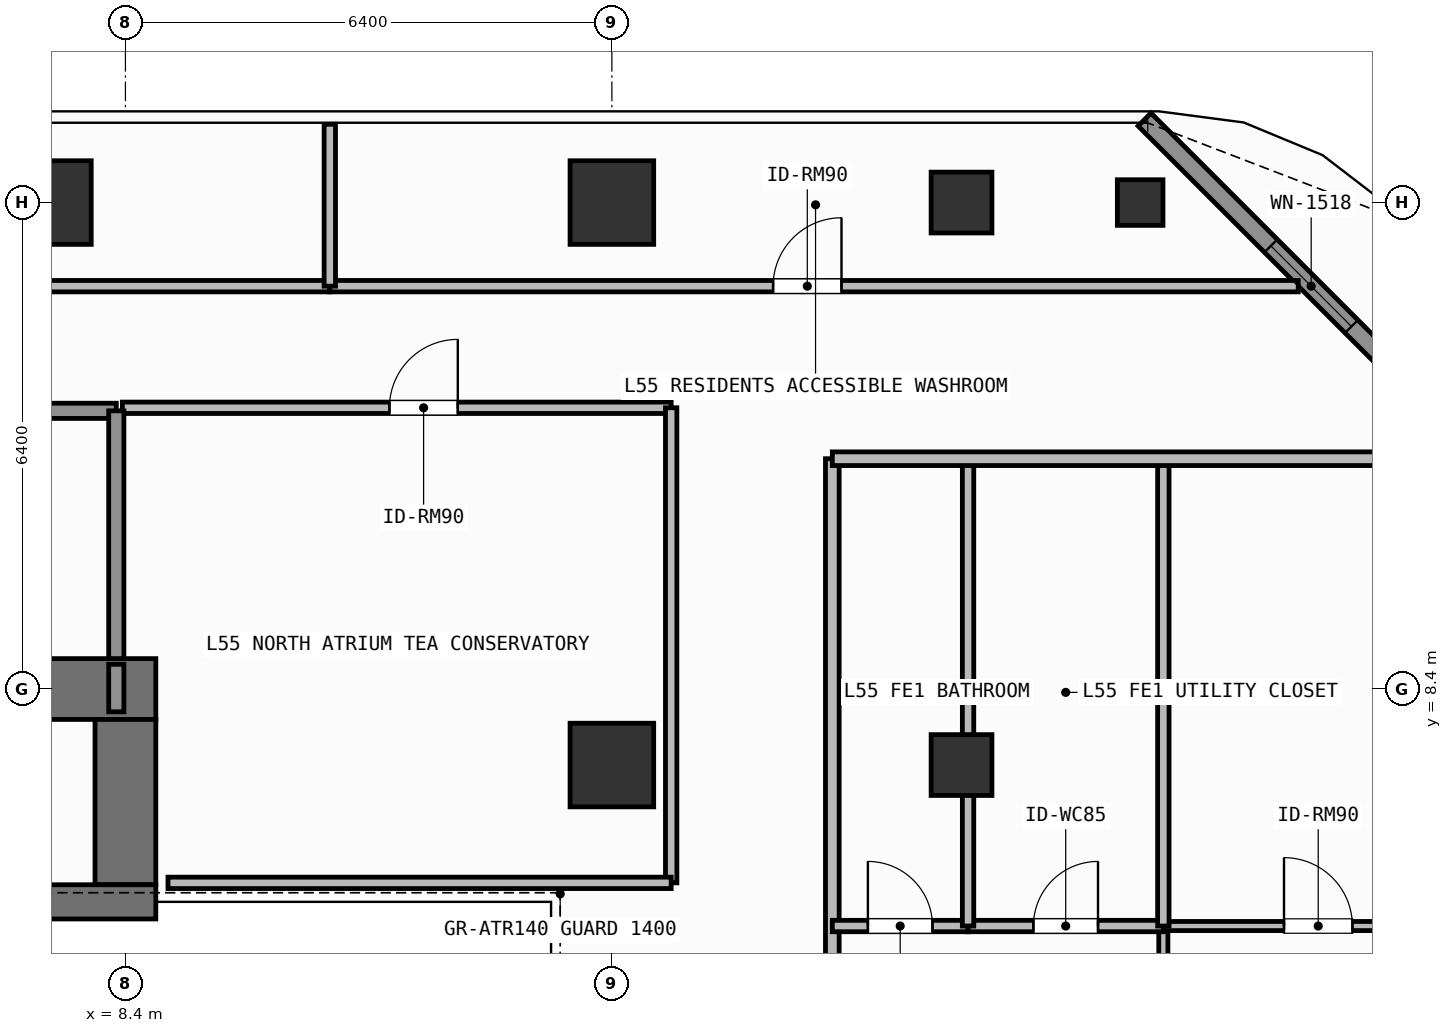
"""IFC4 building model, lengths in metres.
Left out: names, types, materials, properties, quantities, classifications, styles, units other than length and angle.
Written with IfcOpenShell. Run it as: python <this file> out.ifc"""

import sys

from ifc_helpers import new_model, si_unit, direction, frame, frame_2d, origin, origin_2d, place, context, subcontext, project, spatial, rectangle, hollow_rectangle, extrude, element, fill, save


model = new_model("IFC4")
c1 = context("Model", 3, precision=1e-05, world=origin(), true_north=direction((0.0, 1.0)))
c2 = subcontext(c1, "Body", "Model", "MODEL_VIEW")
j1 = project(units=[si_unit("LENGTHUNIT", "METRE"), si_unit("PLANEANGLEUNIT", "RADIAN")], contexts=[c1])
p1 = place(None, origin())
s1 = spatial("IfcSite", under=j1, at=p1, CompositionType="ELEMENT")
p2 = place(p1, origin())
s2 = spatial("IfcBuilding", under=s1, at=p2, CompositionType="ELEMENT")
p3 = place(p2, frame((0.0, 0.0, 223.5)))
s3 = spatial("IfcBuildingStorey", under=s2, at=p3, CompositionType="ELEMENT", Elevation=223.5)
p4 = place(p3, frame((-7.55, 8.4, 0.0), z_axis=(0.0, 0.0, 1.0), x_axis=(1.0, 0.0, 0.0)))
e1 = element("IfcWall", 1, at=p4, inside=s3, PredefinedType="SHEAR", context=c2, shape_type="SweptSolid", body=[
    extrude(rectangle(XDim=16.35, YDim=0.8, at=frame_2d((8.175, 0.0))), origin(), (0.0, 0.0, 1.0), 3.9),
])
p5 = place(p3, frame((8.4, 5.825, 0.0), z_axis=(0.0, 0.0, 1.0), x_axis=(0.0, 1.0, 0.0)))
e2 = element("IfcWall", 2, at=p5, inside=s3, PredefinedType="SHEAR", context=c2, shape_type="SweptSolid", body=[
    extrude(rectangle(XDim=2.175, YDim=0.8, at=frame_2d((1.087, 0.0))), origin(), (0.0, 0.0, 1.0), 3.9),
])
p6 = place(p3, frame((3.045, 5.6, 0.0), z_axis=(0.0, 0.0, 1.0), x_axis=(1.0, 0.0, 0.0)))
e3 = element("IfcWall", 3, at=p6, inside=s3, PredefinedType="SHEAR", context=c2, shape_type="SweptSolid", body=[
    extrude(rectangle(XDim=5.755, YDim=0.45, at=frame_2d((2.877, 0.0))), origin(), (0.0, 0.0, 1.0), 3.9),
])
for number, where, z_axis, x_axis in (
    (4, (7.4, 14.8, 0.0), (0.0, 0.0, 1.0), (1.0, 0.0, 0.0)),
    (5, (14.8, 14.8, 0.0), (0.0, 0.0, 1.0), (1.0, 0.0, 0.0)),
    (6, (14.8, 7.4, 0.0), (0.0, 0.0, 1.0), (1.0, 0.0, 0.0)),
):
    element("IfcColumn", number, at=place(p3, frame(where, z_axis=z_axis, x_axis=x_axis)), inside=s3, PredefinedType="COLUMN", context=c2, shape_type="SweptSolid", body=[
        extrude(rectangle(XDim=1.1, YDim=1.1, at=origin_2d()), origin(), (0.0, 0.0, 1.0), 3.9),
    ])
for number, where, z_axis, x_axis in (
    (7, (19.4, 7.4, 0.0), (0.0, 0.0, 1.0), (1.0, 0.0, 0.0)),
    (8, (19.4, 14.8, 0.0), (0.0, 0.0, 1.0), (1.0, 0.0, 0.0)),
):
    element("IfcColumn", number, at=place(p3, frame(where, z_axis=z_axis, x_axis=x_axis)), inside=s3, PredefinedType="COLUMN", context=c2, shape_type="SweptSolid", body=[
        extrude(hollow_rectangle(XDim=0.8, YDim=0.8, WallThickness=0.036, at=origin_2d()), origin(), (0.0, 0.0, 1.0), 3.9),
    ])
p7 = place(p3, frame((21.75, 14.8, 0.0), z_axis=(0.0, 0.0, 1.0), x_axis=(1.0, 0.0, 0.0)))
e9 = element("IfcColumn", 9, at=p7, inside=s3, PredefinedType="COLUMN", context=c2, shape_type="SweptSolid", body=[
    extrude(hollow_rectangle(XDim=0.6, YDim=0.6, WallThickness=0.028, at=origin_2d()), origin(), (0.0, 0.0, 1.0), 3.9),
])
p8 = place(p3, frame((21.808, 15.892, 0.0), z_axis=(0.0, 0.0, 1.0), x_axis=(0.707106781187, -0.707106781187, 0.0)))
e10 = element("IfcWall", 10, at=p8, inside=s3, PredefinedType="SOLIDWALL", context=c2, shape_type="SweptSolid", body=[
    extrude(rectangle(XDim=6.201, YDim=0.24, at=frame_2d((3.101, 0.0))), origin(), (0.0, 0.0, 1.0), 3.68),
])
p9 = place(p8, frame((2.351, 0.0, 0.8)))
e11 = element("IfcOpeningElement", 11, at=p9, cuts=e10, PredefinedType="OPENING", context=c2, shape_type="SweptSolid", body=[
    extrude(rectangle(XDim=1.5, YDim=1.85, at=frame_2d((0.75, 0.925))), frame((0.0, 0.13, 0.0), z_axis=(0.0, -1.0, 0.0), x_axis=(1.0, 0.0, 0.0)), (0.0, 0.0, 1.0), 0.26),
])
p10 = place(p3, frame((4.58, 12.06, 0.0), z_axis=(0.0, 0.0, 1.0), x_axis=(1.0, 0.0, 0.0)))
e12 = element("IfcWall", 12, at=p10, inside=s3, PredefinedType="SOLIDWALL", context=c2, shape_type="SweptSolid", body=[
    extrude(rectangle(XDim=3.7, YDim=0.2, at=frame_2d((1.85, 0.0))), origin(), (0.0, 0.0, 1.0), 3.68),
])
p11 = place(p10, frame((1.212, 0.0, 0.0)))
e13 = element("IfcOpeningElement", 13, at=p11, cuts=e12, PredefinedType="OPENING", context=c2, shape_type="SweptSolid", body=[
    extrude(rectangle(XDim=1.1, YDim=2.15, at=frame_2d((0.55, 1.075))), frame((0.0, 0.11, 0.0), z_axis=(0.0, -1.0, 0.0), x_axis=(1.0, 0.0, 0.0)), (0.0, 0.0, 1.0), 0.22),
])
p12 = place(p3, frame((8.36, 12.1, 0.0), z_axis=(0.0, 0.0, 1.0), x_axis=(1.0, 0.0, 0.0)))
e14 = element("IfcWall", 14, at=p12, inside=s3, PredefinedType="PARTITIONING", context=c2, shape_type="SweptSolid", body=[
    extrude(rectangle(XDim=7.22, YDim=0.15, at=frame_2d((3.61, 0.0))), origin(), (0.0, 0.0, 1.0), 3.68),
])
p13 = place(p12, frame((3.513, 0.0, 0.0)))
e15 = element("IfcOpeningElement", 15, at=p13, cuts=e14, PredefinedType="OPENING", context=c2, shape_type="SweptSolid", body=[
    extrude(rectangle(XDim=0.9, YDim=2.1, at=frame_2d((0.45, 1.05))), frame((0.0, 0.085, 0.0), z_axis=(0.0, -1.0, 0.0), x_axis=(1.0, 0.0, 0.0)), (0.0, 0.0, 1.0), 0.17),
])
p14 = place(p3, frame((-0.494, 13.7, 0.0), z_axis=(0.0, 0.0, 1.0), x_axis=(1.0, 0.0, 0.0)))
e16 = element("IfcWall", 16, at=p14, inside=s3, PredefinedType="PARTITIONING", context=c2, shape_type="SweptSolid", body=[
    extrude(rectangle(XDim=11.583, YDim=0.15, at=frame_2d((5.792, 0.0))), origin(), (0.0, 0.0, 1.0), 3.68),
])
p15 = place(p14, frame((5.342, 0.0, 0.0)))
e17 = element("IfcOpeningElement", 17, at=p15, cuts=e16, PredefinedType="OPENING", context=c2, shape_type="SweptSolid", body=[
    extrude(rectangle(XDim=0.9, YDim=2.1, at=frame_2d((0.45, 1.05))), frame((0.0, 0.085, 0.0), z_axis=(0.0, -1.0, 0.0), x_axis=(1.0, 0.0, 0.0)), (0.0, 0.0, 1.0), 0.17),
])
p16 = place(p3, frame((11.089, 13.7, 0.0), z_axis=(0.0, 0.0, 1.0), x_axis=(1.0, 0.0, 0.0)))
e18 = element("IfcWall", 18, at=p16, inside=s3, PredefinedType="PARTITIONING", context=c2, shape_type="SweptSolid", body=[
    extrude(rectangle(XDim=12.741, YDim=0.15, at=frame_2d((6.371, 0.0))), origin(), (0.0, 0.0, 1.0), 3.68),
])
p17 = place(p16, frame((5.832, 0.0, 0.0)))
e19 = element("IfcOpeningElement", 19, at=p17, cuts=e18, PredefinedType="OPENING", context=c2, shape_type="SweptSolid", body=[
    extrude(rectangle(XDim=0.9, YDim=2.1, at=frame_2d((0.45, 1.05))), frame((0.0, 0.085, 0.0), z_axis=(0.0, -1.0, 0.0), x_axis=(1.0, 0.0, 0.0)), (0.0, 0.0, 1.0), 0.17),
])
p18 = place(p3, frame((17.7, -12.12, 0.0), z_axis=(0.0, 0.0, 1.0), x_axis=(0.0, 1.0, 0.0)))
e20 = element("IfcWall", 20, at=p18, inside=s3, PredefinedType="PARTITIONING", context=c2, shape_type="SweptSolid", body=[
    extrude(rectangle(XDim=23.55, YDim=0.18, at=frame_2d((11.775, 0.0))), origin(), (0.0, 0.0, 1.0), 3.68),
])
p19 = place(p18, frame((11.454, 0.0, 0.0)))
e21 = element("IfcOpeningElement", 21, at=p19, cuts=e20, PredefinedType="OPENING", context=c2, shape_type="SweptSolid", body=[
    extrude(rectangle(XDim=1.0, YDim=2.2, at=frame_2d((0.5, 1.1))), frame((0.0, 0.1, 0.0), z_axis=(0.0, -1.0, 0.0), x_axis=(1.0, 0.0, 0.0)), (0.0, 0.0, 1.0), 0.2),
])
p20 = place(p3, frame((22.055, -5.412, 0.0), z_axis=(0.0, 0.0, 1.0), x_axis=(0.0, 1.0, 0.0)))
e22 = element("IfcWall", 22, at=p20, inside=s3, PredefinedType="PARTITIONING", context=c2, shape_type="SweptSolid", body=[
    extrude(rectangle(XDim=10.694, YDim=0.12, at=frame_2d((5.347, 0.0))), origin(), (0.0, 0.0, 1.0), 3.68),
])
p21 = place(p20, frame((4.808, 0.0, 0.0)))
e23 = element("IfcOpeningElement", 23, at=p21, cuts=e22, PredefinedType="OPENING", context=c2, shape_type="SweptSolid", body=[
    extrude(rectangle(XDim=0.9, YDim=2.1, at=frame_2d((0.45, 1.05))), frame((0.0, 0.07, 0.0), z_axis=(0.0, -1.0, 0.0), x_axis=(1.0, 0.0, 0.0)), (0.0, 0.0, 1.0), 0.14),
])
p22 = place(p3, frame((17.7, 5.282, 0.0), z_axis=(0.0, 0.0, 1.0), x_axis=(1.0, 0.0, 0.0)))
e24 = element("IfcWall", 24, at=p22, inside=s3, PredefinedType="PARTITIONING", context=c2, shape_type="SweptSolid", body=[
    extrude(rectangle(XDim=1.786, YDim=0.15, at=frame_2d((0.893, 0.0))), origin(), (0.0, 0.0, 1.0), 3.68),
])
p23 = place(p22, frame((0.468, 0.0, 0.0)))
e25 = element("IfcOpeningElement", 25, at=p23, cuts=e24, PredefinedType="OPENING", context=c2, shape_type="SweptSolid", body=[
    extrude(rectangle(XDim=0.85, YDim=2.1, at=frame_2d((0.425, 1.05))), frame((0.0, 0.085, 0.0), z_axis=(0.0, -1.0, 0.0), x_axis=(1.0, 0.0, 0.0)), (0.0, 0.0, 1.0), 0.17),
])
p24 = place(p3, frame((19.486, 5.282, 0.0), z_axis=(0.0, 0.0, 1.0), x_axis=(1.0, 0.0, 0.0)))
e26 = element("IfcWall", 26, at=p24, inside=s3, PredefinedType="PARTITIONING", context=c2, shape_type="SweptSolid", body=[
    extrude(rectangle(XDim=2.569, YDim=0.15, at=frame_2d((1.284, 0.0))), origin(), (0.0, 0.0, 1.0), 3.68),
])
p25 = place(p24, frame((0.86, 0.0, 0.0)))
e27 = element("IfcOpeningElement", 27, at=p25, cuts=e26, PredefinedType="OPENING", context=c2, shape_type="SweptSolid", body=[
    extrude(rectangle(XDim=0.85, YDim=2.1, at=frame_2d((0.425, 1.05))), frame((0.0, 0.085, 0.0), z_axis=(0.0, -1.0, 0.0), x_axis=(1.0, 0.0, 0.0)), (0.0, 0.0, 1.0), 0.17),
])
p26 = place(p3, frame((22.055, 5.282, 0.0), z_axis=(0.0, 0.0, 1.0), x_axis=(1.0, 0.0, 0.0)))
e28 = element("IfcWall", 28, at=p26, inside=s3, PredefinedType="PARTITIONING", context=c2, shape_type="SweptSolid", body=[
    extrude(rectangle(XDim=4.075, YDim=0.12, at=frame_2d((2.038, 0.0))), origin(), (0.0, 0.0, 1.0), 3.68),
])
p27 = place(p26, frame((1.587, 0.0, 0.0)))
e29 = element("IfcOpeningElement", 29, at=p27, cuts=e28, PredefinedType="OPENING", context=c2, shape_type="SweptSolid", body=[
    extrude(rectangle(XDim=0.9, YDim=2.1, at=frame_2d((0.45, 1.05))), frame((0.0, 0.07, 0.0), z_axis=(0.0, -1.0, 0.0), x_axis=(1.0, 0.0, 0.0)), (0.0, 0.0, 1.0), 0.14),
])
p28 = place(p3, frame((8.28, 8.8, 0.0), z_axis=(0.0, 0.0, 1.0), x_axis=(0.0, 1.0, 0.0)))
e30 = element("IfcWall", 30, at=p28, inside=s3, PredefinedType="SOLIDWALL", context=c2, shape_type="SweptSolid", body=[
    extrude(rectangle(XDim=3.26, YDim=0.2, at=frame_2d((1.63, 0.0))), origin(), (0.0, 0.0, 1.0), 3.68),
])
p29 = place(p3, frame((8.28, 8.1, 0.0), z_axis=(0.0, 0.0, 1.0), x_axis=(0.0, 1.0, 0.0)))
e31 = element("IfcWall", 31, at=p29, inside=s3, PredefinedType="SOLIDWALL", context=c2, shape_type="SweptSolid", body=[
    extrude(rectangle(XDim=0.625, YDim=0.2, at=frame_2d((0.312, 0.0))), origin(), (0.0, 0.0, 1.0), 3.68),
])
p30 = place(p3, frame((15.58, 5.85, 0.0), z_axis=(0.0, 0.0, 1.0), x_axis=(0.0, 1.0, 0.0)))
e32 = element("IfcWall", 32, at=p30, inside=s3, PredefinedType="PARTITIONING", context=c2, shape_type="SweptSolid", body=[
    extrude(rectangle(XDim=6.25, YDim=0.15, at=frame_2d((3.125, 0.0))), origin(), (0.0, 0.0, 1.0), 3.68),
])
p31 = place(p3, frame((8.96, 5.85, 0.0), z_axis=(0.0, 0.0, 1.0), x_axis=(1.0, 0.0, 0.0)))
e33 = element("IfcWall", 33, at=p31, inside=s3, PredefinedType="PARTITIONING", context=c2, shape_type="SweptSolid", body=[
    extrude(rectangle(XDim=6.62, YDim=0.15, at=frame_2d((3.31, 0.0))), origin(), (0.0, 0.0, 1.0), 3.68),
])
p32 = place(p3, frame((11.089, 13.7, 0.0), z_axis=(0.0, 0.0, 1.0), x_axis=(0.0, 1.0, 0.0)))
e34 = element("IfcWall", 34, at=p32, inside=s3, PredefinedType="PARTITIONING", context=c2, shape_type="SweptSolid", body=[
    extrude(rectangle(XDim=2.13, YDim=0.15, at=frame_2d((1.065, 0.0))), origin(), (0.0, 0.0, 1.0), 3.68),
])
p33 = place(p3, frame((19.486, 5.282, 0.0), z_axis=(0.0, 0.0, 1.0), x_axis=(0.0, 1.0, 0.0)))
e35 = element("IfcWall", 35, at=p33, inside=s3, PredefinedType="PARTITIONING", context=c2, shape_type="SweptSolid", body=[
    extrude(rectangle(XDim=6.148, YDim=0.15, at=frame_2d((3.074, 0.0))), origin(), (0.0, 0.0, 1.0), 3.182),
])
p34 = place(p3, frame((22.055, 5.282, 0.0), z_axis=(0.0, 0.0, 1.0), x_axis=(0.0, 1.0, 0.0)))
e36 = element("IfcWall", 36, at=p34, inside=s3, PredefinedType="PARTITIONING", context=c2, shape_type="SweptSolid", body=[
    extrude(rectangle(XDim=6.148, YDim=0.15, at=frame_2d((3.074, 0.0))), origin(), (0.0, 0.0, 1.0), 3.68),
])
p35 = place(p3, frame((17.7, 11.43, 0.0), z_axis=(0.0, 0.0, 1.0), x_axis=(1.0, 0.0, 0.0)))
e37 = element("IfcWall", 37, at=p35, inside=s3, PredefinedType="PARTITIONING", context=c2, shape_type="SweptSolid", body=[
    extrude(rectangle(XDim=8.43, YDim=0.18, at=frame_2d((4.215, 0.0))), origin(), (0.0, 0.0, 1.0), 3.42),
])
p36 = place(p9, origin())
e38 = element("IfcWindow", 38, at=p36, inside=s3, PartitioningType="SINGLE_PANEL", PredefinedType="WINDOW", context=c2, shape_type="SweptSolid", body=[
    extrude(rectangle(XDim=1.5, YDim=1.85, at=frame_2d((0.75, 0.925))), frame((0.0, 0.03, 0.0), z_axis=(0.0, -1.0, 0.0), x_axis=(1.0, 0.0, 0.0)), (0.0, 0.0, 1.0), 0.06),
])
fill(e11, e38)
p37 = place(p13, origin())
e39 = element("IfcDoor", 39, at=p37, inside=s3, OperationType="SINGLE_SWING_RIGHT", PredefinedType="DOOR", context=c2, shape_type="SweptSolid", body=[
    extrude(rectangle(XDim=0.9, YDim=2.1, at=frame_2d((0.45, 1.05))), frame((0.0, 0.025, 0.0), z_axis=(0.0, -1.0, 0.0), x_axis=(1.0, 0.0, 0.0)), (0.0, 0.0, 1.0), 0.05),
])
fill(e15, e39)
p38 = place(p17, origin())
e40 = element("IfcDoor", 40, at=p38, inside=s3, OperationType="SINGLE_SWING_RIGHT", PredefinedType="DOOR", context=c2, shape_type="SweptSolid", body=[
    extrude(rectangle(XDim=0.9, YDim=2.1, at=frame_2d((0.45, 1.05))), frame((0.0, 0.025, 0.0), z_axis=(0.0, -1.0, 0.0), x_axis=(1.0, 0.0, 0.0)), (0.0, 0.0, 1.0), 0.05),
])
fill(e19, e40)
p39 = place(p23, origin())
e41 = element("IfcDoor", 41, at=p39, inside=s3, OperationType="SINGLE_SWING_LEFT", PredefinedType="DOOR", context=c2, shape_type="SweptSolid", body=[
    extrude(rectangle(XDim=0.85, YDim=2.1, at=frame_2d((0.425, 1.05))), frame((0.0, 0.025, 0.0), z_axis=(0.0, -1.0, 0.0), x_axis=(1.0, 0.0, 0.0)), (0.0, 0.0, 1.0), 0.05),
])
fill(e25, e41)
p40 = place(p25, origin())
e42 = element("IfcDoor", 42, at=p40, inside=s3, OperationType="SINGLE_SWING_RIGHT", PredefinedType="DOOR", context=c2, shape_type="SweptSolid", body=[
    extrude(rectangle(XDim=0.85, YDim=2.1, at=frame_2d((0.425, 1.05))), frame((0.0, 0.025, 0.0), z_axis=(0.0, -1.0, 0.0), x_axis=(1.0, 0.0, 0.0)), (0.0, 0.0, 1.0), 0.05),
])
fill(e27, e42)
p41 = place(p27, origin())
e43 = element("IfcDoor", 43, at=p41, inside=s3, OperationType="SINGLE_SWING_LEFT", PredefinedType="DOOR", context=c2, shape_type="SweptSolid", body=[
    extrude(rectangle(XDim=0.9, YDim=2.1, at=frame_2d((0.45, 1.05))), frame((0.0, 0.025, 0.0), z_axis=(0.0, -1.0, 0.0), x_axis=(1.0, 0.0, 0.0)), (0.0, 0.0, 1.0), 0.05),
])
fill(e29, e43)
save(model, sys.argv[1])
